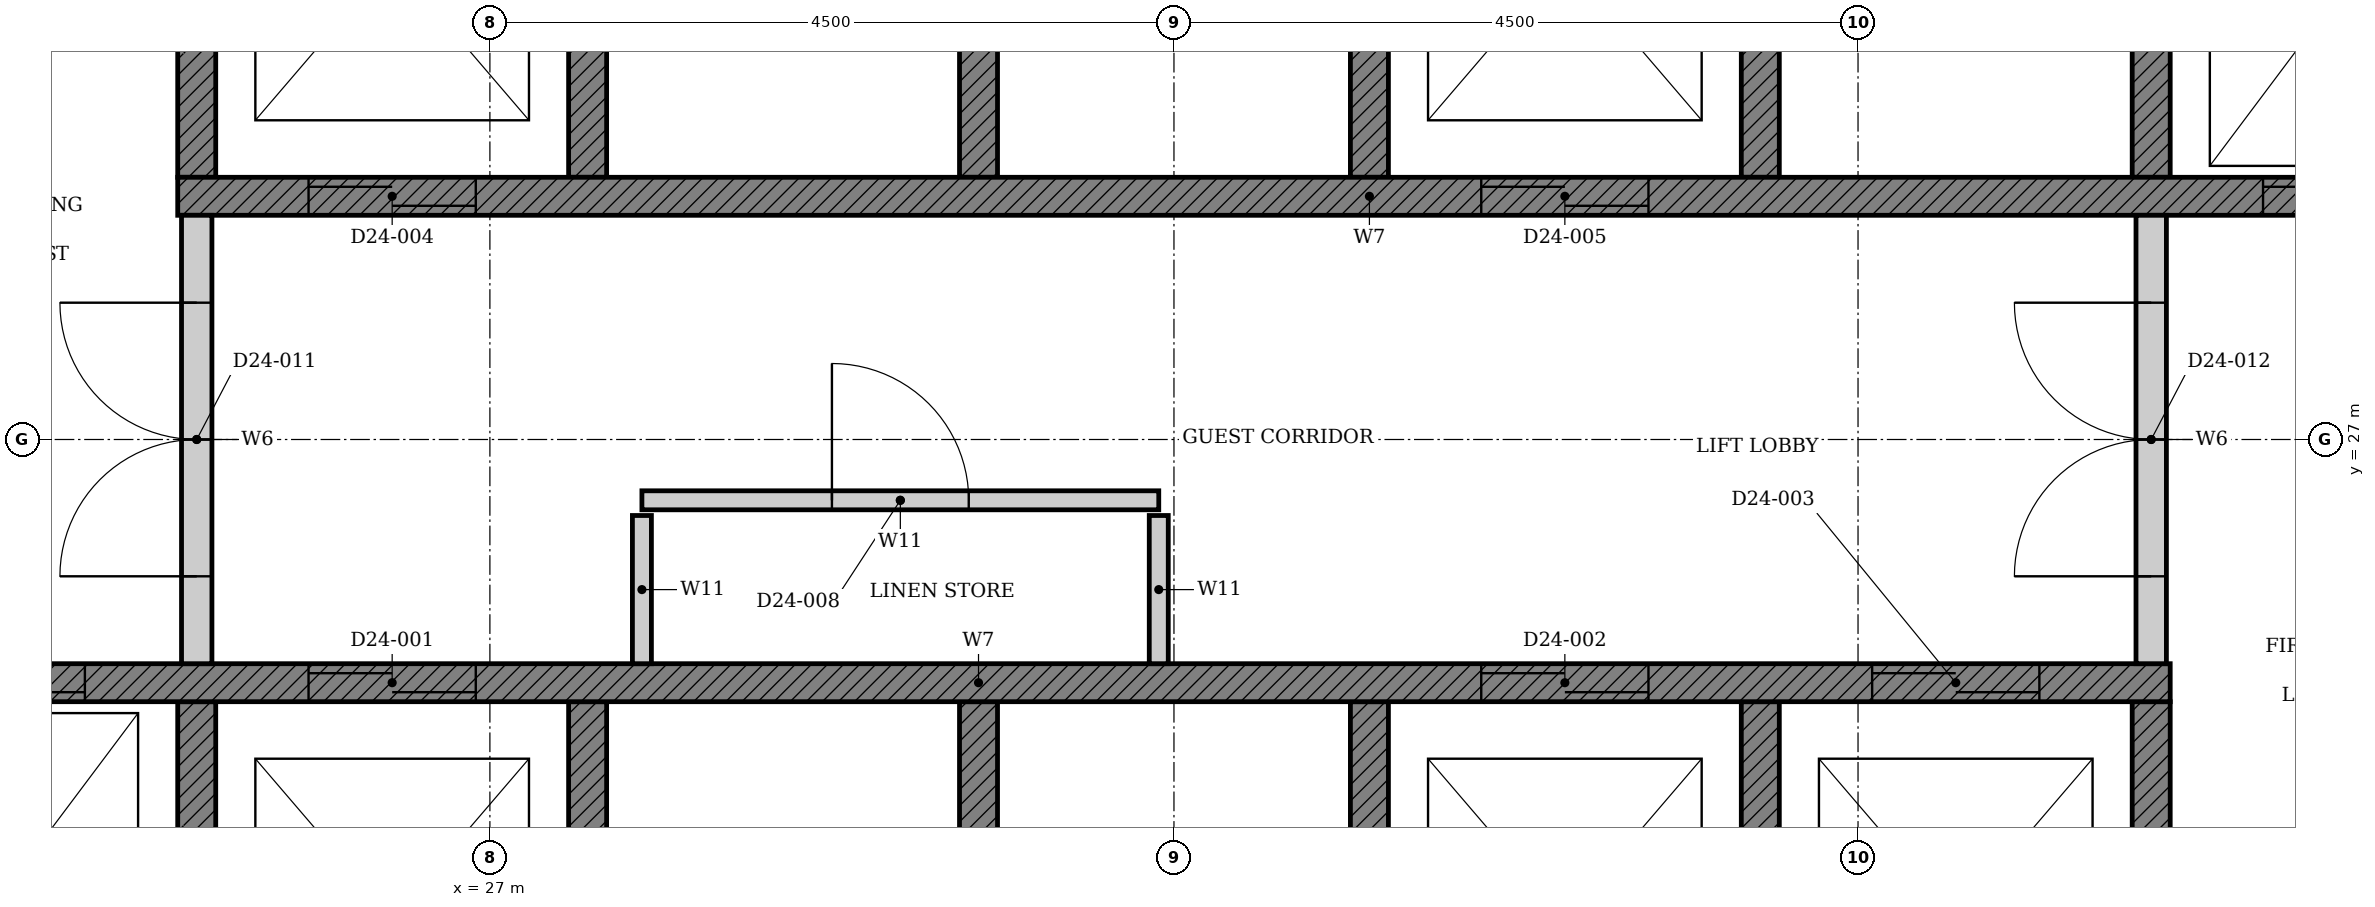
"""IFC4 building model, lengths in metres.
Left out: names, types, materials, properties, quantities, classifications, styles, units other than length and angle.
Written with IfcOpenShell. Run it as: python <this file> out.ifc"""

import sys

from ifc_helpers import new_model, si_unit, direction, frame, frame_2d, origin, place, context, subcontext, project, spatial, polyline, rectangle, outline, extrude, element, fill, save


model = new_model("IFC4")
c1 = context("Model", 3, precision=1e-05, world=origin(), true_north=direction((0.0, 1.0)))
c2 = subcontext(c1, "Body", "Model", "MODEL_VIEW")
j1 = project(units=[si_unit("LENGTHUNIT", "METRE"), si_unit("PLANEANGLEUNIT", "RADIAN")], contexts=[c1])
p1 = place(None, origin())
s1 = spatial("IfcSite", under=j1, at=p1, CompositionType="ELEMENT")
p2 = place(p1, origin())
s2 = spatial("IfcBuilding", under=s1, at=p2, CompositionType="ELEMENT")
p3 = place(p2, frame((0.0, 0.0, 100.8)))
s3 = spatial("IfcBuildingStorey", under=s2, at=p3, CompositionType="ELEMENT", Elevation=100.8)
p4 = place(p3, origin())
e1 = element("IfcWall", 1, at=p4, inside=s3, PredefinedType="SHEAR", context=c2, shape_type="SweptSolid", body=[
    extrude(outline(polyline([(22.375, 22.35), (38.053, 22.35), (38.053, 25.275), (37.803, 25.275), (37.803, 22.65), (35.482, 22.65), (35.482, 25.275), (35.232, 25.275), (35.232, 22.65), (32.911, 22.65), (32.911, 25.275), (32.661, 25.275), (32.661, 22.65), (30.339, 22.65), (30.339, 25.275), (30.089, 25.275), (30.089, 22.65), (27.768, 22.65), (27.768, 25.275), (27.518, 25.275), (27.518, 22.65), (25.197, 22.65), (25.197, 25.275), (24.947, 25.275), (24.947, 22.65), (22.625, 22.65), (22.625, 25.275), (22.375, 25.275), (22.375, 22.35)])), origin(), (0.0, 0.0, 1.0), 3.3),
])
p5 = place(p3, origin())
e2 = element("IfcWall", 2, at=p5, inside=s3, PredefinedType="SHEAR", context=c2, shape_type="SweptSolid", body=[
    extrude(outline(polyline([(24.947, 28.725), (25.197, 28.725), (25.197, 31.35), (27.518, 31.35), (27.518, 28.725), (27.768, 28.725), (27.768, 31.35), (30.089, 31.35), (30.089, 28.725), (30.339, 28.725), (30.339, 31.35), (32.661, 31.35), (32.661, 28.725), (32.911, 28.725), (32.911, 31.35), (35.232, 31.35), (35.232, 28.725), (35.482, 28.725), (35.482, 31.35), (37.803, 31.35), (37.803, 28.725), (38.053, 28.725), (38.053, 31.35), (40.375, 31.35), (40.375, 28.725), (40.625, 28.725), (40.625, 31.65), (24.947, 31.65), (24.947, 28.725)])), origin(), (0.0, 0.0, 1.0), 3.3),
])
p6 = place(p3, frame((22.375, 25.4, 0.0), z_axis=(0.0, 0.0, 1.0), x_axis=(1.0, 0.0, 0.0)))
e3 = element("IfcWall", 3, at=p6, inside=s3, PredefinedType="SHEAR", context=c2, shape_type="SweptSolid", body=[
    extrude(rectangle(XDim=15.678, YDim=0.25, at=frame_2d((7.839, 0.0))), origin(), (0.0, 0.0, 1.0), 3.3),
])
p7 = place(p6, frame((3.432, 0.0, 0.0)))
e4 = element("IfcOpeningElement", 4, at=p7, cuts=e3, PredefinedType="OPENING", context=c2, shape_type="SweptSolid", body=[
    extrude(rectangle(XDim=1.1, YDim=2.1, at=frame_2d((0.55, 1.05))), frame((0.0, 0.135, 0.0), z_axis=(0.0, -1.0, 0.0), x_axis=(1.0, 0.0, 0.0)), (0.0, 0.0, 1.0), 0.27),
])
p8 = place(p6, frame((11.146, 0.0, 0.0)))
e5 = element("IfcOpeningElement", 5, at=p8, cuts=e3, PredefinedType="OPENING", context=c2, shape_type="SweptSolid", body=[
    extrude(rectangle(XDim=1.1, YDim=2.1, at=frame_2d((0.55, 1.05))), frame((0.0, 0.135, 0.0), z_axis=(0.0, -1.0, 0.0), x_axis=(1.0, 0.0, 0.0)), (0.0, 0.0, 1.0), 0.27),
])
p9 = place(p6, frame((13.718, 0.0, 0.0)))
e6 = element("IfcOpeningElement", 6, at=p9, cuts=e3, PredefinedType="OPENING", context=c2, shape_type="SweptSolid", body=[
    extrude(rectangle(XDim=1.1, YDim=2.1, at=frame_2d((0.55, 1.05))), frame((0.0, 0.135, 0.0), z_axis=(0.0, -1.0, 0.0), x_axis=(1.0, 0.0, 0.0)), (0.0, 0.0, 1.0), 0.27),
])
p10 = place(p6, frame((0.861, 0.0, 0.0)))
e7 = element("IfcOpeningElement", 7, at=p10, cuts=e3, PredefinedType="OPENING", context=c2, shape_type="SweptSolid", body=[
    extrude(rectangle(XDim=1.1, YDim=2.1, at=frame_2d((0.55, 1.05))), frame((0.0, 0.135, 0.0), z_axis=(0.0, -1.0, 0.0), x_axis=(1.0, 0.0, 0.0)), (0.0, 0.0, 1.0), 0.27),
])
p11 = place(p3, frame((24.947, 28.6, 0.0), z_axis=(0.0, 0.0, 1.0), x_axis=(1.0, 0.0, 0.0)))
e8 = element("IfcWall", 8, at=p11, inside=s3, PredefinedType="SHEAR", context=c2, shape_type="SweptSolid", body=[
    extrude(rectangle(XDim=15.678, YDim=0.25, at=frame_2d((7.839, 0.0))), origin(), (0.0, 0.0, 1.0), 3.3),
])
p12 = place(p11, frame((0.861, 0.0, 0.0)))
e9 = element("IfcOpeningElement", 9, at=p12, cuts=e8, PredefinedType="OPENING", context=c2, shape_type="SweptSolid", body=[
    extrude(rectangle(XDim=1.1, YDim=2.1, at=frame_2d((0.55, 1.05))), frame((0.0, 0.135, 0.0), z_axis=(0.0, -1.0, 0.0), x_axis=(1.0, 0.0, 0.0)), (0.0, 0.0, 1.0), 0.27),
])
p13 = place(p11, frame((8.575, 0.0, 0.0)))
e10 = element("IfcOpeningElement", 10, at=p13, cuts=e8, PredefinedType="OPENING", context=c2, shape_type="SweptSolid", body=[
    extrude(rectangle(XDim=1.1, YDim=2.1, at=frame_2d((0.55, 1.05))), frame((0.0, 0.135, 0.0), z_axis=(0.0, -1.0, 0.0), x_axis=(1.0, 0.0, 0.0)), (0.0, 0.0, 1.0), 0.27),
])
p14 = place(p11, frame((13.718, 0.0, 0.0)))
e11 = element("IfcOpeningElement", 11, at=p14, cuts=e8, PredefinedType="OPENING", context=c2, shape_type="SweptSolid", body=[
    extrude(rectangle(XDim=1.1, YDim=2.1, at=frame_2d((0.55, 1.05))), frame((0.0, 0.135, 0.0), z_axis=(0.0, -1.0, 0.0), x_axis=(1.0, 0.0, 0.0)), (0.0, 0.0, 1.0), 0.27),
])
p15 = place(p3, frame((28.0, 26.6, 0.0), z_axis=(0.0, 0.0, 1.0), x_axis=(1.0, 0.0, 0.0)))
e12 = element("IfcWall", 12, at=p15, inside=s3, PredefinedType="PARTITIONING", context=c2, shape_type="SweptSolid", body=[
    extrude(rectangle(XDim=3.4, YDim=0.125, at=frame_2d((1.7, 0.0))), origin(), (0.0, 0.0, 1.0), 3.3),
])
p16 = place(p15, frame((1.25, 0.0, 0.0)))
e13 = element("IfcOpeningElement", 13, at=p16, cuts=e12, PredefinedType="OPENING", context=c2, shape_type="SweptSolid", body=[
    extrude(rectangle(XDim=0.9, YDim=2.1, at=frame_2d((0.45, 1.05))), frame((0.0, 0.073, 0.0), z_axis=(0.0, -1.0, 0.0), x_axis=(1.0, 0.0, 0.0)), (0.0, 0.0, 1.0), 0.145),
])
for number, where, z_axis, x_axis in (
    (14, (28.0, 25.525, 0.0), (0.0, 0.0, 1.0), (0.0, 1.0, 0.0)),
    (15, (31.4, 25.525, 0.0), (0.0, 0.0, 1.0), (0.0, 1.0, 0.0)),
):
    element("IfcWall", number, at=place(p3, frame(where, z_axis=z_axis, x_axis=x_axis)), inside=s3, PredefinedType="PARTITIONING", context=c2, shape_type="SweptSolid", body=[
        extrude(rectangle(XDim=0.975, YDim=0.125, at=frame_2d((0.488, 0.0))), origin(), (0.0, 0.0, 1.0), 3.3),
    ])
p17 = place(p3, frame((25.072, 25.525, 0.0), z_axis=(0.0, 0.0, 1.0), x_axis=(0.0, 1.0, 0.0)))
e16 = element("IfcWall", 16, at=p17, inside=s3, PredefinedType="PARTITIONING", context=c2, shape_type="SweptSolid", body=[
    extrude(rectangle(XDim=2.95, YDim=0.2, at=frame_2d((1.475, 0.0))), origin(), (0.0, 0.0, 1.0), 3.3),
])
p18 = place(p17, frame((0.575, 0.0, 0.0)))
e17 = element("IfcOpeningElement", 17, at=p18, cuts=e16, PredefinedType="OPENING", context=c2, shape_type="SweptSolid", body=[
    extrude(rectangle(XDim=1.8, YDim=2.1, at=frame_2d((0.9, 1.05))), frame((0.0, 0.11, 0.0), z_axis=(0.0, -1.0, 0.0), x_axis=(1.0, 0.0, 0.0)), (0.0, 0.0, 1.0), 0.22),
])
p19 = place(p3, frame((37.928, 25.525, 0.0), z_axis=(0.0, 0.0, 1.0), x_axis=(0.0, 1.0, 0.0)))
e18 = element("IfcWall", 18, at=p19, inside=s3, PredefinedType="PARTITIONING", context=c2, shape_type="SweptSolid", body=[
    extrude(rectangle(XDim=2.95, YDim=0.2, at=frame_2d((1.475, 0.0))), origin(), (0.0, 0.0, 1.0), 3.3),
])
p20 = place(p19, frame((0.575, 0.0, 0.0)))
e19 = element("IfcOpeningElement", 19, at=p20, cuts=e18, PredefinedType="OPENING", context=c2, shape_type="SweptSolid", body=[
    extrude(rectangle(XDim=1.8, YDim=2.1, at=frame_2d((0.9, 1.05))), frame((0.0, 0.11, 0.0), z_axis=(0.0, -1.0, 0.0), x_axis=(1.0, 0.0, 0.0)), (0.0, 0.0, 1.0), 0.22),
])
p21 = place(p7, origin())
e20 = element("IfcDoor", 20, at=p21, inside=s3, OperationType="DOUBLE_DOOR_SLIDING", PredefinedType="DOOR", context=c2, shape_type="SweptSolid", body=[
    extrude(rectangle(XDim=1.1, YDim=2.1, at=frame_2d((0.55, 1.05))), frame((0.0, 0.025, 0.0), z_axis=(0.0, -1.0, 0.0), x_axis=(1.0, 0.0, 0.0)), (0.0, 0.0, 1.0), 0.05),
])
fill(e4, e20)
p22 = place(p8, origin())
e21 = element("IfcDoor", 21, at=p22, inside=s3, OperationType="DOUBLE_DOOR_SLIDING", PredefinedType="DOOR", context=c2, shape_type="SweptSolid", body=[
    extrude(rectangle(XDim=1.1, YDim=2.1, at=frame_2d((0.55, 1.05))), frame((0.0, 0.025, 0.0), z_axis=(0.0, -1.0, 0.0), x_axis=(1.0, 0.0, 0.0)), (0.0, 0.0, 1.0), 0.05),
])
fill(e5, e21)
p23 = place(p9, origin())
e22 = element("IfcDoor", 22, at=p23, inside=s3, OperationType="DOUBLE_DOOR_SLIDING", PredefinedType="DOOR", context=c2, shape_type="SweptSolid", body=[
    extrude(rectangle(XDim=1.1, YDim=2.1, at=frame_2d((0.55, 1.05))), frame((0.0, 0.025, 0.0), z_axis=(0.0, -1.0, 0.0), x_axis=(1.0, 0.0, 0.0)), (0.0, 0.0, 1.0), 0.05),
])
fill(e6, e22)
p24 = place(p12, origin())
e23 = element("IfcDoor", 23, at=p24, inside=s3, OperationType="DOUBLE_DOOR_SLIDING", PredefinedType="DOOR", context=c2, shape_type="SweptSolid", body=[
    extrude(rectangle(XDim=1.1, YDim=2.1, at=frame_2d((0.55, 1.05))), frame((0.0, 0.025, 0.0), z_axis=(0.0, -1.0, 0.0), x_axis=(1.0, 0.0, 0.0)), (0.0, 0.0, 1.0), 0.05),
])
fill(e9, e23)
p25 = place(p13, origin())
e24 = element("IfcDoor", 24, at=p25, inside=s3, OperationType="DOUBLE_DOOR_SLIDING", PredefinedType="DOOR", context=c2, shape_type="SweptSolid", body=[
    extrude(rectangle(XDim=1.1, YDim=2.1, at=frame_2d((0.55, 1.05))), frame((0.0, 0.025, 0.0), z_axis=(0.0, -1.0, 0.0), x_axis=(1.0, 0.0, 0.0)), (0.0, 0.0, 1.0), 0.05),
])
fill(e10, e24)
p26 = place(p10, origin())
e25 = element("IfcDoor", 25, at=p26, inside=s3, OperationType="DOUBLE_DOOR_SLIDING", PredefinedType="DOOR", context=c2, shape_type="SweptSolid", body=[
    extrude(rectangle(XDim=1.1, YDim=2.1, at=frame_2d((0.55, 1.05))), frame((0.0, 0.025, 0.0), z_axis=(0.0, -1.0, 0.0), x_axis=(1.0, 0.0, 0.0)), (0.0, 0.0, 1.0), 0.05),
])
fill(e7, e25)
p27 = place(p14, origin())
e26 = element("IfcDoor", 26, at=p27, inside=s3, OperationType="DOUBLE_DOOR_SLIDING", PredefinedType="DOOR", context=c2, shape_type="SweptSolid", body=[
    extrude(rectangle(XDim=1.1, YDim=2.1, at=frame_2d((0.55, 1.05))), frame((0.0, 0.025, 0.0), z_axis=(0.0, -1.0, 0.0), x_axis=(1.0, 0.0, 0.0)), (0.0, 0.0, 1.0), 0.05),
])
fill(e11, e26)
p28 = place(p16, origin())
e27 = element("IfcDoor", 27, at=p28, inside=s3, OperationType="SINGLE_SWING_LEFT", PredefinedType="DOOR", context=c2, shape_type="SweptSolid", body=[
    extrude(rectangle(XDim=0.9, YDim=2.1, at=frame_2d((0.45, 1.05))), frame((0.0, 0.025, 0.0), z_axis=(0.0, -1.0, 0.0), x_axis=(1.0, 0.0, 0.0)), (0.0, 0.0, 1.0), 0.05),
])
fill(e13, e27)
p29 = place(p18, origin())
e28 = element("IfcDoor", 28, at=p29, inside=s3, OperationType="DOUBLE_DOOR_SINGLE_SWING", PredefinedType="DOOR", context=c2, shape_type="SweptSolid", body=[
    extrude(rectangle(XDim=1.8, YDim=2.1, at=frame_2d((0.9, 1.05))), frame((0.0, 0.025, 0.0), z_axis=(0.0, -1.0, 0.0), x_axis=(1.0, 0.0, 0.0)), (0.0, 0.0, 1.0), 0.05),
])
fill(e17, e28)
p30 = place(p20, origin())
e29 = element("IfcDoor", 29, at=p30, inside=s3, OperationType="DOUBLE_DOOR_SINGLE_SWING", PredefinedType="DOOR", context=c2, shape_type="SweptSolid", body=[
    extrude(rectangle(XDim=1.8, YDim=2.1, at=frame_2d((0.9, 1.05))), frame((0.0, 0.025, 0.0), z_axis=(0.0, -1.0, 0.0), x_axis=(1.0, 0.0, 0.0)), (0.0, 0.0, 1.0), 0.05),
])
fill(e19, e29)
save(model, sys.argv[1])
